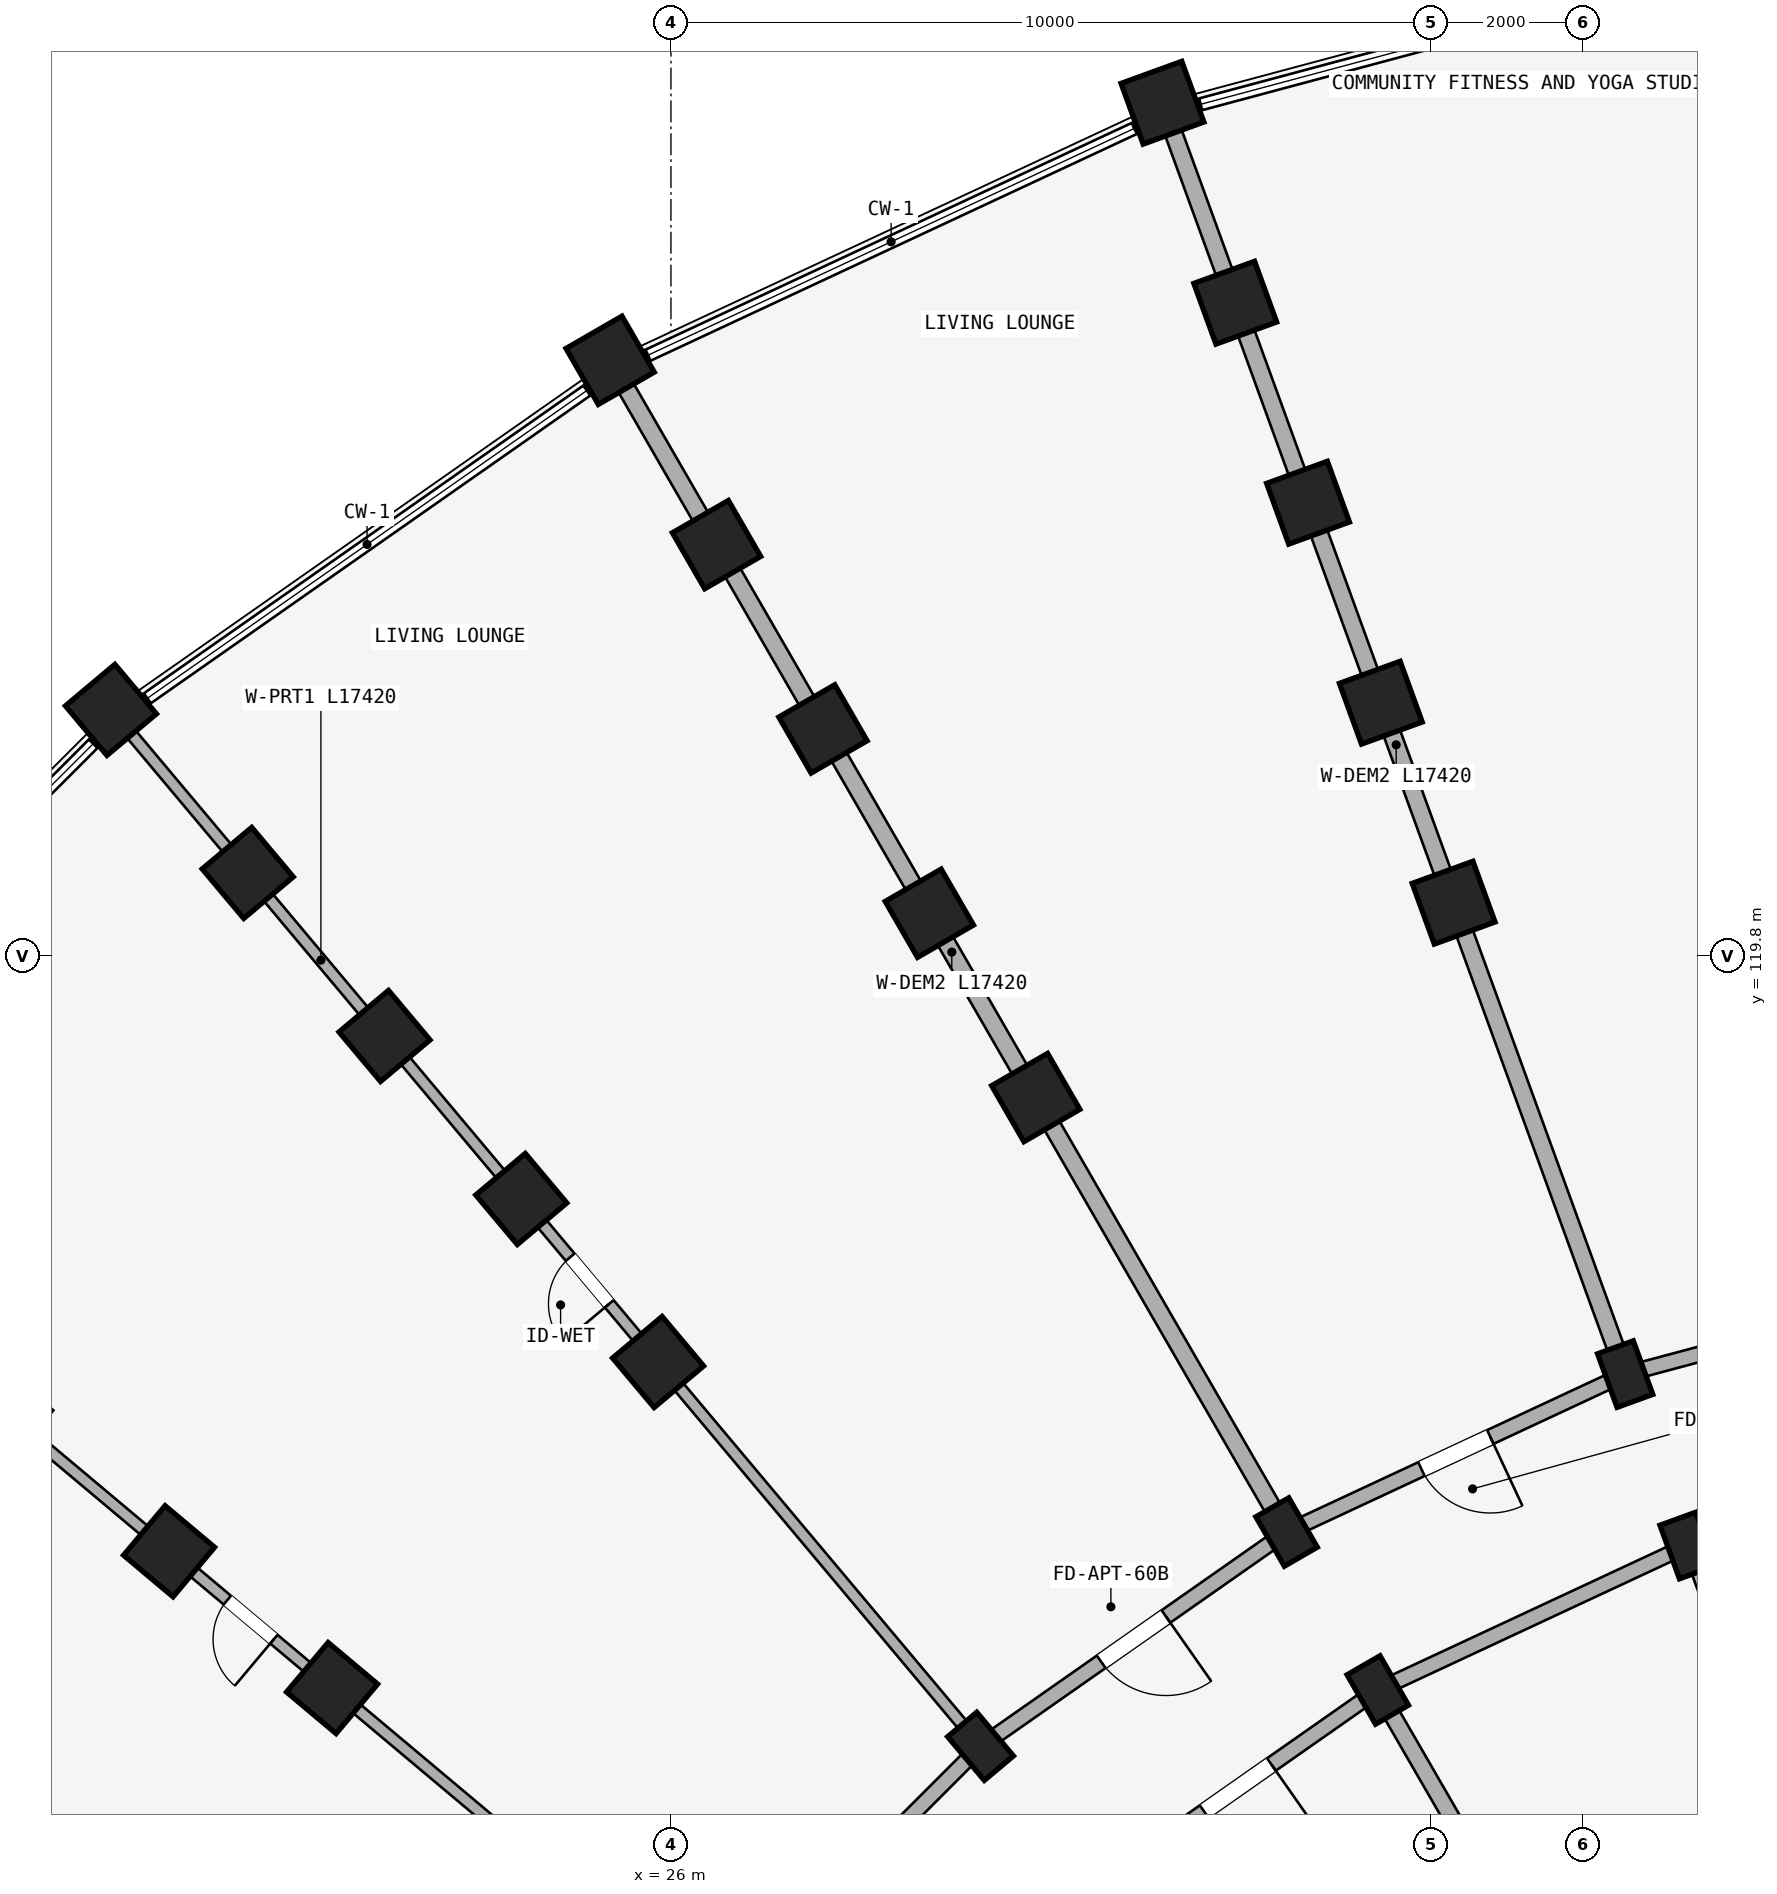
"""IFC4 building model, lengths in metres.
Left out: names, types, materials, properties, quantities, classifications, styles, units other than length and angle.
Written with IfcOpenShell. Run it as: python <this file> out.ifc"""

import sys

from ifc_helpers import new_model, si_unit, direction, frame, frame_2d, origin, origin_2d, place, context, subcontext, project, spatial, rectangle, extrude, element, fill, save


model = new_model("IFC4")
c1 = context("Model", 3, precision=1e-05, world=origin(), true_north=direction((0.0, 1.0)))
c2 = subcontext(c1, "Body", "Model", "MODEL_VIEW")
j1 = project(units=[si_unit("LENGTHUNIT", "METRE"), si_unit("PLANEANGLEUNIT", "RADIAN")], contexts=[c1])
p1 = place(None, origin())
s1 = spatial("IfcSite", under=j1, at=p1, CompositionType="ELEMENT")
p2 = place(p1, origin())
s2 = spatial("IfcBuilding", under=s1, at=p2, CompositionType="ELEMENT")
p3 = place(p2, frame((0.0, 0.0, 4.5)))
s3 = spatial("IfcBuildingStorey", under=s2, at=p3, CompositionType="ELEMENT", Elevation=4.5)
for number, where, z_axis, x_axis in (
    (1, (39.376, 112.044, 0.0), (0.0, 0.0, 1.0), (0.94, 0.342, 0.0)),
    (2, (38.555, 114.299, 0.0), (0.0, 0.0, 1.0), (0.94, 0.342, 0.0)),
):
    element("IfcColumn", number, at=place(p3, frame(where, z_axis=z_axis, x_axis=x_axis)), inside=s3, PredefinedType="COLUMN", context=c2, shape_type="SweptSolid", body=[
        extrude(rectangle(XDim=0.5, YDim=0.75, at=origin_2d()), origin(), (0.0, 0.0, 1.0), 3.98),
    ])
for number, where, z_axis, x_axis in (
    (3, (36.298, 120.501, 0.0), (0.0, 0.0, 1.0), (0.94, 0.342, 0.0)),
    (4, (35.34, 123.132, 0.0), (0.0, 0.0, 1.0), (0.94, 0.342, 0.0)),
    (5, (34.382, 125.764, 0.0), (0.0, 0.0, 1.0), (0.94, 0.342, 0.0)),
    (6, (33.425, 128.395, 0.0), (0.0, 0.0, 1.0), (0.94, 0.342, 0.0)),
    (7, (32.467, 131.026, 0.0), (0.0, 0.0, 1.0), (0.94, 0.342, 0.0)),
):
    element("IfcColumn", number, at=place(p3, frame(where, z_axis=z_axis, x_axis=x_axis)), inside=s3, PredefinedType="COLUMN", context=c2, shape_type="SweptSolid", body=[
        extrude(rectangle(XDim=0.85, YDim=0.85, at=origin_2d()), origin(), (0.0, 0.0, 1.0), 3.98),
    ])
for number, where, z_axis, x_axis in (
    (8, (35.3, 110.144, 0.0), (0.0, 0.0, 1.0), (0.866, 0.5, 0.0)),
    (9, (34.1, 112.222, 0.0), (0.0, 0.0, 1.0), (0.866, 0.5, 0.0)),
):
    element("IfcColumn", number, at=place(p3, frame(where, z_axis=z_axis, x_axis=x_axis)), inside=s3, PredefinedType="COLUMN", context=c2, shape_type="SweptSolid", body=[
        extrude(rectangle(XDim=0.5, YDim=0.75, at=origin_2d()), origin(), (0.0, 0.0, 1.0), 3.98),
    ])
for number, where, z_axis, x_axis in (
    (10, (30.8, 117.938, 0.0), (0.0, 0.0, 1.0), (0.866, 0.5, 0.0)),
    (11, (29.4, 120.363, 0.0), (0.0, 0.0, 1.0), (0.866, 0.5, 0.0)),
    (12, (28.0, 122.787, 0.0), (0.0, 0.0, 1.0), (0.866, 0.5, 0.0)),
    (13, (26.6, 125.212, 0.0), (0.0, 0.0, 1.0), (0.866, 0.5, 0.0)),
    (14, (25.2, 127.637, 0.0), (0.0, 0.0, 1.0), (0.866, 0.5, 0.0)),
):
    element("IfcColumn", number, at=place(p3, frame(where, z_axis=z_axis, x_axis=x_axis)), inside=s3, PredefinedType="COLUMN", context=c2, shape_type="SweptSolid", body=[
        extrude(rectangle(XDim=0.85, YDim=0.85, at=origin_2d()), origin(), (0.0, 0.0, 1.0), 3.98),
    ])
p4 = place(p3, frame((30.073, 109.402, 0.0), z_axis=(0.0, 0.0, 1.0), x_axis=(0.766044443119, 0.642787609687, 0.0)))
e15 = element("IfcColumn", 15, at=p4, inside=s3, PredefinedType="COLUMN", context=c2, shape_type="SweptSolid", body=[
    extrude(rectangle(XDim=0.5, YDim=0.75, at=origin_2d()), origin(), (0.0, 0.0, 1.0), 3.98),
])
for number, where, z_axis, x_axis in (
    (16, (25.831, 114.458, 0.0), (0.0, 0.0, 1.0), (0.766, 0.643, 0.0)),
    (17, (24.031, 116.603, 0.0), (0.0, 0.0, 1.0), (0.766, 0.643, 0.0)),
    (18, (22.231, 118.748, 0.0), (0.0, 0.0, 1.0), (0.766, 0.643, 0.0)),
    (19, (20.432, 120.893, 0.0), (0.0, 0.0, 1.0), (0.766, 0.643, 0.0)),
    (20, (18.632, 123.038, 0.0), (0.0, 0.0, 1.0), (0.766, 0.643, 0.0)),
    (21, (21.542, 110.169, 0.0), (0.0, 0.0, 1.0), (0.643, 0.766, 0.0)),
    (22, (19.397, 111.969, 0.0), (0.0, 0.0, 1.0), (0.643, 0.766, 0.0)),
):
    element("IfcColumn", number, at=place(p3, frame(where, z_axis=z_axis, x_axis=x_axis)), inside=s3, PredefinedType="COLUMN", context=c2, shape_type="SweptSolid", body=[
        extrude(rectangle(XDim=0.85, YDim=0.85, at=origin_2d()), origin(), (0.0, 0.0, 1.0), 3.98),
    ])
p5 = place(p3, frame((43.72, 113.208, 0.0), z_axis=(0.0, 0.0, 1.0), x_axis=(-0.965934240054, -0.258787642463, 0.0)))
e23 = element("IfcWall", 23, at=p5, inside=s3, PredefinedType="STANDARD", context=c2, shape_type="SweptSolid", body=[
    extrude(rectangle(XDim=4.497, YDim=0.2, at=frame_2d((2.249, 0.0))), origin(), (0.0, 0.0, 1.0), 3.322),
])
p6 = place(p3, frame((43.303, 115.572, 0.0), z_axis=(0.0, 0.0, 1.0), x_axis=(-0.965930095386, -0.258803112091, 0.0)))
e24 = element("IfcWall", 24, at=p6, inside=s3, PredefinedType="STANDARD", context=c2, shape_type="SweptSolid", body=[
    extrude(rectangle(XDim=4.916, YDim=0.2, at=frame_2d((2.458, 0.0))), origin(), (0.0, 0.0, 1.0), 3.322),
])
p7 = place(p3, frame((39.376, 112.044, 0.0), z_axis=(0.0, 0.0, 1.0), x_axis=(-0.906307919131, -0.422617978463, 0.0)))
e25 = element("IfcWall", 25, at=p7, inside=s3, PredefinedType="STANDARD", context=c2, shape_type="SweptSolid", body=[
    extrude(rectangle(XDim=4.497, YDim=0.2, at=frame_2d((2.249, 0.0))), origin(), (0.0, 0.0, 1.0), 3.322),
])
p8 = place(p3, frame((38.555, 114.299, 0.0), z_axis=(0.0, 0.0, 1.0), x_axis=(-0.906302381024, -0.422629854778, 0.0)))
e26 = element("IfcWall", 26, at=p8, inside=s3, PredefinedType="STANDARD", context=c2, shape_type="SweptSolid", body=[
    extrude(rectangle(XDim=4.915, YDim=0.2, at=frame_2d((2.458, 0.0))), origin(), (0.0, 0.0, 1.0), 3.322),
])
p9 = place(p8, frame((1.958, 0.0, 0.0)))
e27 = element("IfcOpeningElement", 27, at=p9, cuts=e26, PredefinedType="OPENING", context=c2, shape_type="SweptSolid", body=[
    extrude(rectangle(XDim=1.0, YDim=2.15, at=frame_2d((0.5, 1.075))), frame((0.0, 0.11, 0.0), z_axis=(0.0, -1.0, 0.0), x_axis=(1.0, 0.0, 0.0)), (0.0, 0.0, 1.0), 0.22),
])
p10 = place(p3, frame((35.3, 110.144, 0.0), z_axis=(0.0, 0.0, 1.0), x_axis=(-0.819155404658, -0.573571637217, 0.0)))
e28 = element("IfcWall", 28, at=p10, inside=s3, PredefinedType="STANDARD", context=c2, shape_type="SweptSolid", body=[
    extrude(rectangle(XDim=4.497, YDim=0.2, at=frame_2d((2.249, 0.0))), origin(), (0.0, 0.0, 1.0), 3.322),
])
p11 = place(p10, frame((1.709, 0.0, 0.0)))
e29 = element("IfcOpeningElement", 29, at=p11, cuts=e28, PredefinedType="OPENING", context=c2, shape_type="SweptSolid", body=[
    extrude(rectangle(XDim=1.08, YDim=2.15, at=frame_2d((0.54, 1.075))), frame((0.0, 0.11, 0.0), z_axis=(0.0, -1.0, 0.0), x_axis=(1.0, 0.0, 0.0)), (0.0, 0.0, 1.0), 0.22),
])
p12 = place(p3, frame((34.1, 112.222, 0.0), z_axis=(0.0, 0.0, 1.0), x_axis=(-0.819140911474, -0.573592335331, 0.0)))
e30 = element("IfcWall", 30, at=p12, inside=s3, PredefinedType="STANDARD", context=c2, shape_type="SweptSolid", body=[
    extrude(rectangle(XDim=4.916, YDim=0.2, at=frame_2d((2.458, 0.0))), origin(), (0.0, 0.0, 1.0), 3.322),
])
p13 = place(p12, frame((1.938, 0.0, 0.0)))
e31 = element("IfcOpeningElement", 31, at=p13, cuts=e30, PredefinedType="OPENING", context=c2, shape_type="SweptSolid", body=[
    extrude(rectangle(XDim=1.04, YDim=2.15, at=frame_2d((0.52, 1.075))), frame((0.0, 0.11, 0.0), z_axis=(0.0, -1.0, 0.0), x_axis=(1.0, 0.0, 0.0)), (0.0, 0.0, 1.0), 0.22),
])
p14 = place(p3, frame((30.073, 109.402, 0.0), z_axis=(0.0, 0.0, 1.0), x_axis=(-0.707106781187, -0.707106781187, 0.0)))
e32 = element("IfcWall", 32, at=p14, inside=s3, PredefinedType="STANDARD", context=c2, shape_type="SweptSolid", body=[
    extrude(rectangle(XDim=4.916, YDim=0.2, at=frame_2d((2.458, 0.0))), origin(), (0.0, 0.0, 1.0), 3.322),
])
p15 = place(p3, frame((41.702, 105.654, 0.0), z_axis=(0.0, 0.0, 1.0), x_axis=(-0.342010221662, 0.939696231917, 0.0)))
e33 = element("IfcWall", 33, at=p15, inside=s3, PredefinedType="PARTITIONING", context=c2, shape_type="SweptSolid", body=[
    extrude(rectangle(XDim=6.75, YDim=0.15, at=frame_2d((3.375, 0.0))), origin(), (0.0, 0.0, 1.0), 3.322),
])
p16 = place(p15, frame((3.242, 0.0, 0.0)))
e34 = element("IfcOpeningElement", 34, at=p16, cuts=e33, PredefinedType="OPENING", context=c2, shape_type="SweptSolid", body=[
    extrude(rectangle(XDim=0.94, YDim=2.1, at=frame_2d((0.47, 1.05))), frame((0.0, 0.085, 0.0), z_axis=(0.0, -1.0, 0.0), x_axis=(1.0, 0.0, 0.0)), (0.0, 0.0, 1.0), 0.17),
])
p17 = place(p3, frame((38.521, 114.393, 0.0), z_axis=(0.0, 0.0, 1.0), x_axis=(-0.342022120477, 0.939691901159, 0.0)))
e35 = element("IfcWall", 35, at=p17, inside=s3, PredefinedType="STANDARD", context=c2, shape_type="SweptSolid", body=[
    extrude(rectangle(XDim=17.42, YDim=0.23, at=frame_2d((8.71, 0.0))), origin(), (0.0, 0.0, 1.0), 3.322),
])
p18 = place(p3, frame((38.7, 104.254, 0.0), z_axis=(0.0, 0.0, 1.0), x_axis=(-0.499997969693, 0.866026575979, 0.0)))
e36 = element("IfcWall", 36, at=p18, inside=s3, PredefinedType="STANDARD", context=c2, shape_type="SweptSolid", body=[
    extrude(rectangle(XDim=6.75, YDim=0.22, at=frame_2d((3.375, 0.0))), origin(), (0.0, 0.0, 1.0), 3.322),
])
p19 = place(p3, frame((34.05, 112.309, 0.0), z_axis=(0.0, 0.0, 1.0), x_axis=(-0.499997843263, 0.866026648973, 0.0)))
e37 = element("IfcWall", 37, at=p19, inside=s3, PredefinedType="STANDARD", context=c2, shape_type="SweptSolid", body=[
    extrude(rectangle(XDim=17.42, YDim=0.23, at=frame_2d((8.71, 0.0))), origin(), (0.0, 0.0, 1.0), 3.322),
])
p20 = place(p3, frame((30.009, 109.479, 0.0), z_axis=(0.0, 0.0, 1.0), x_axis=(-0.642784757967, 0.766046835987, 0.0)))
e38 = element("IfcWall", 38, at=p20, inside=s3, PredefinedType="PARTITIONING", context=c2, shape_type="SweptSolid", body=[
    extrude(rectangle(XDim=17.42, YDim=0.15, at=frame_2d((8.71, 0.0))), origin(), (0.0, 0.0, 1.0), 3.322),
])
p21 = place(p20, frame((7.5, 0.0, 0.0)))
e39 = element("IfcOpeningElement", 39, at=p21, cuts=e38, PredefinedType="OPENING", context=c2, shape_type="SweptSolid", body=[
    extrude(rectangle(XDim=0.8, YDim=2.1, at=frame_2d((0.4, 1.05))), frame((0.0, 0.085, 0.0), z_axis=(0.0, -1.0, 0.0), x_axis=(1.0, 0.0, 0.0)), (0.0, 0.0, 1.0), 0.17),
])
p22 = place(p3, frame((26.521, 105.991, 0.0), z_axis=(0.0, 0.0, 1.0), x_axis=(-0.766046835987, 0.642784757967, 0.0)))
e40 = element("IfcWall", 40, at=p22, inside=s3, PredefinedType="PARTITIONING", context=c2, shape_type="SweptSolid", body=[
    extrude(rectangle(XDim=17.42, YDim=0.15, at=frame_2d((8.71, 0.0))), origin(), (0.0, 0.0, 1.0), 3.322),
])
p23 = place(p22, frame((7.5, 0.0, 0.0)))
e41 = element("IfcOpeningElement", 41, at=p23, cuts=e40, PredefinedType="OPENING", context=c2, shape_type="SweptSolid", body=[
    extrude(rectangle(XDim=0.8, YDim=2.1, at=frame_2d((0.4, 1.05))), frame((0.0, 0.085, 0.0), z_axis=(0.0, -1.0, 0.0), x_axis=(1.0, 0.0, 0.0)), (0.0, 0.0, 1.0), 0.17),
])
p24 = place(p3, frame((23.691, 101.95, 0.0), z_axis=(0.0, 0.0, 1.0), x_axis=(-0.866026648973, 0.499997843263, 0.0)))
e42 = element("IfcWall", 42, at=p24, inside=s3, PredefinedType="STANDARD", context=c2, shape_type="SweptSolid", body=[
    extrude(rectangle(XDim=17.42, YDim=0.23, at=frame_2d((8.71, 0.0))), origin(), (0.0, 0.0, 1.0), 3.322),
])
p25 = place(p21, frame((0.8, 0.0, 0.0), z_axis=(0.0, 0.0, 1.0), x_axis=(-1.0, 0.0, 0.0)))
e43 = element("IfcDoor", 43, at=p25, inside=s3, OperationType="SINGLE_SWING_RIGHT", PredefinedType="DOOR", context=c2, shape_type="SweptSolid", body=[
    extrude(rectangle(XDim=0.8, YDim=2.1, at=frame_2d((0.4, 1.05))), frame((0.0, 0.025, 0.0), z_axis=(0.0, -1.0, 0.0), x_axis=(1.0, 0.0, 0.0)), (0.0, 0.0, 1.0), 0.05),
])
fill(e39, e43)
p26 = place(p23, frame((0.8, 0.0, 0.0), z_axis=(0.0, 0.0, 1.0), x_axis=(-1.0, 0.0, 0.0)))
e44 = element("IfcDoor", 44, at=p26, inside=s3, OperationType="SINGLE_SWING_RIGHT", PredefinedType="DOOR", context=c2, shape_type="SweptSolid", body=[
    extrude(rectangle(XDim=0.8, YDim=2.1, at=frame_2d((0.4, 1.05))), frame((0.0, 0.025, 0.0), z_axis=(0.0, -1.0, 0.0), x_axis=(1.0, 0.0, 0.0)), (0.0, 0.0, 1.0), 0.05),
])
fill(e41, e44)
p27 = place(p9, frame((1.0, 0.0, 0.0), z_axis=(0.0, 0.0, 1.0), x_axis=(-1.0, 0.0, 0.0)))
e45 = element("IfcDoor", 45, at=p27, inside=s3, OperationType="SINGLE_SWING_RIGHT", PredefinedType="DOOR", context=c2, shape_type="SweptSolid", body=[
    extrude(rectangle(XDim=1.0, YDim=2.15, at=frame_2d((0.5, 1.075))), frame((0.0, 0.025, 0.0), z_axis=(0.0, -1.0, 0.0), x_axis=(1.0, 0.0, 0.0)), (0.0, 0.0, 1.0), 0.05),
])
fill(e27, e45)
p28 = place(p13, origin())
e46 = element("IfcDoor", 46, at=p28, inside=s3, OperationType="SINGLE_SWING_LEFT", PredefinedType="DOOR", context=c2, shape_type="SweptSolid", body=[
    extrude(rectangle(XDim=1.04, YDim=2.15, at=frame_2d((0.52, 1.075))), frame((0.0, 0.025, 0.0), z_axis=(0.0, -1.0, 0.0), x_axis=(1.0, 0.0, 0.0)), (0.0, 0.0, 1.0), 0.05),
])
fill(e31, e46)
p29 = place(p11, frame((1.08, 0.0, 0.0), z_axis=(0.0, 0.0, 1.0), x_axis=(-1.0, 0.0, 0.0)))
e47 = element("IfcDoor", 47, at=p29, inside=s3, OperationType="SINGLE_SWING_RIGHT", PredefinedType="DOOR", context=c2, shape_type="SweptSolid", body=[
    extrude(rectangle(XDim=1.08, YDim=2.15, at=frame_2d((0.54, 1.075))), frame((0.0, 0.025, 0.0), z_axis=(0.0, -1.0, 0.0), x_axis=(1.0, 0.0, 0.0)), (0.0, 0.0, 1.0), 0.05),
])
fill(e29, e47)
save(model, sys.argv[1])
